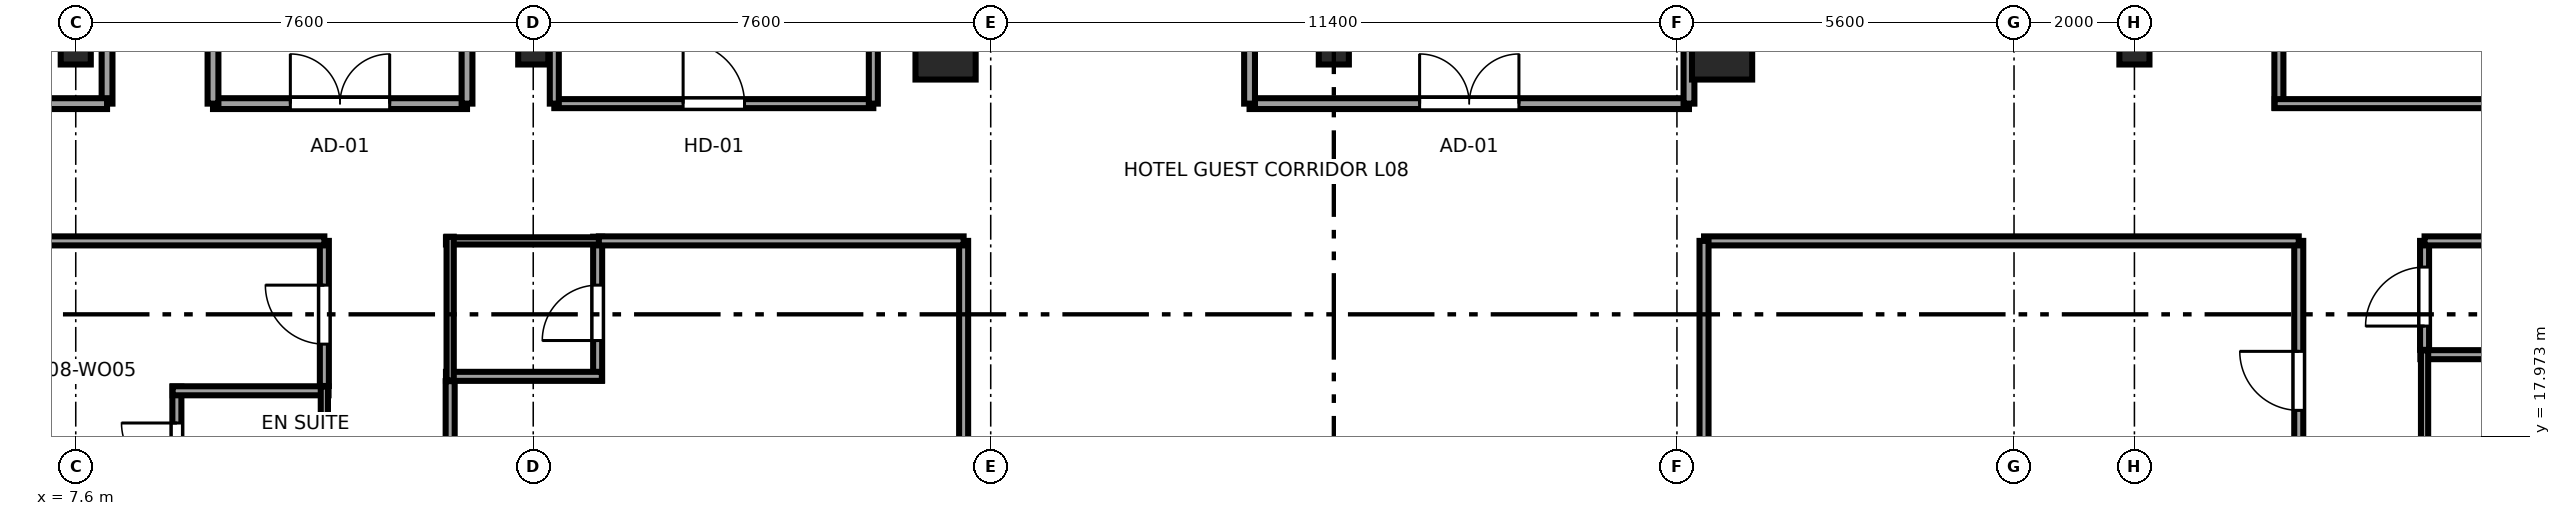
"""IFC4 building model, lengths in metres.
Left out: names, types, materials, properties, quantities, classifications, styles, units other than length and angle.
Written with IfcOpenShell. Run it as: python <this file> out.ifc"""

import sys

from ifc_helpers import new_model, si_unit, direction, frame, frame_2d, origin, origin_2d, place, context, subcontext, project, spatial, rectangle, i_section, extrude, source, transform, mapped, element, fill, save


model = new_model("IFC4")
c1 = context("Model", 3, precision=1e-05, world=origin(), true_north=direction((0.0, 1.0)))
c2 = subcontext(c1, "Body", "Model", "MODEL_VIEW")
j1 = project(units=[si_unit("LENGTHUNIT", "METRE"), si_unit("PLANEANGLEUNIT", "RADIAN")], contexts=[c1])
p1 = place(None, origin())
s1 = spatial("IfcSite", under=j1, at=p1, CompositionType="ELEMENT")
p2 = place(p1, origin())
s2 = spatial("IfcBuilding", under=s1, at=p2, CompositionType="ELEMENT")
p3 = place(p2, frame((0.0, 0.0, 39.1)))
s3 = spatial("IfcBuildingStorey", under=s2, at=p3, CompositionType="ELEMENT", Elevation=39.1)
m1 = source(origin(), c2, "Body", "SweptSolid", [
    extrude(i_section(OverallWidth=0.5, OverallDepth=0.5, WebThickness=0.028, FlangeThickness=0.045, at=origin_2d()), origin(), (0.0, 0.0, 1.0), 3.55),
])
for number, where, z_axis, x_axis in (
    (1, (7.6, 24.4, 0.0), (0.0, 0.0, 1.0), (1.0, 0.0, 0.0)),
    (2, (15.2, 24.4, 0.0), (0.0, 0.0, 1.0), (1.0, 0.0, 0.0)),
):
    element("IfcColumn", number, at=place(p3, frame(where, z_axis=z_axis, x_axis=x_axis)), inside=s3, PredefinedType="COLUMN", context=c2, shape_type="MappedRepresentation", body=[
        mapped(m1, transform((0.0, 0.0, 0.0), x_axis=(1.0, 0.0, 0.0), y_axis=(0.0, 1.0, 0.0), z_axis=(0.0, 0.0, 1.0), scale=1.0)),
    ])
m2 = source(origin(), c2, "Body", "SweptSolid", [
    extrude(rectangle(XDim=1.0, YDim=1.0, at=origin_2d()), origin(), (0.0, 0.0, 1.0), 3.55),
])
for number, where, z_axis, x_axis in (
    (3, (22.05, 24.4, 0.0), (0.0, 0.0, 1.0), (1.0, 0.0, 0.0)),
    (4, (34.95, 24.4, 0.0), (0.0, 0.0, 1.0), (1.0, 0.0, 0.0)),
):
    element("IfcColumn", number, at=place(p3, frame(where, z_axis=z_axis, x_axis=x_axis)), inside=s3, PredefinedType="COLUMN", context=c2, shape_type="MappedRepresentation", body=[
        mapped(m2, transform((0.0, 0.0, 0.0), x_axis=(1.0, 0.0, 0.0), y_axis=(0.0, 1.0, 0.0), z_axis=(0.0, 0.0, 1.0), scale=1.0)),
    ])
for number, where, z_axis, x_axis in (
    (5, (41.8, 24.4, 0.0), (0.0, 0.0, 1.0), (1.0, 0.0, 0.0)),
    (6, (28.5, 24.4, 0.0), (0.0, 0.0, 1.0), (1.0, 0.0, 0.0)),
):
    element("IfcColumn", number, at=place(p3, frame(where, z_axis=z_axis, x_axis=x_axis)), inside=s3, PredefinedType="COLUMN", context=c2, shape_type="MappedRepresentation", body=[
        mapped(m1, transform((0.0, 0.0, 0.0), x_axis=(1.0, 0.0, 0.0), y_axis=(0.0, 1.0, 0.0), z_axis=(0.0, 0.0, 1.0), scale=1.0)),
    ])
p4 = place(p3, frame((9.28, 16.81, 0.0), z_axis=(0.0, 0.0, 1.0), x_axis=(0.0, 1.0, 0.0)))
e7 = element("IfcWall", 7, at=p4, inside=s3, PredefinedType="PARTITIONING", context=c2, shape_type="SweptSolid", body=[
    extrude(rectangle(XDim=1.99, YDim=0.15, at=frame_2d((0.995, 0.0))), origin(), (0.0, 0.0, 1.0), 3.37),
])
p5 = place(p4, frame((0.465, 0.0, 0.0)))
e8 = element("IfcOpeningElement", 8, at=p5, cuts=e7, PredefinedType="OPENING", context=c2, shape_type="SweptSolid", body=[
    extrude(rectangle(XDim=0.92, YDim=2.01, at=frame_2d((0.46, 1.005))), frame((0.0, 0.085, 0.0), z_axis=(0.0, -1.0, 0.0), x_axis=(1.0, 0.0, 0.0)), (0.0, 0.0, 1.0), 0.17),
])
p6 = place(p3, frame((9.21, 18.73, 0.0), z_axis=(0.0, 0.0, 1.0), x_axis=(1.0, 0.0, 0.0)))
e9 = element("IfcWall", 9, at=p6, inside=s3, PredefinedType="PARTITIONING", context=c2, shape_type="SweptSolid", body=[
    extrude(rectangle(XDim=2.59, YDim=0.15, at=frame_2d((1.295, 0.0))), origin(), (0.0, 0.0, 1.0), 3.37),
])
p7 = place(p3, frame((11.73, 16.81, 0.0), z_axis=(0.0, 0.0, 1.0), x_axis=(0.0, 1.0, 0.0)))
e10 = element("IfcWall", 10, at=p7, inside=s3, PredefinedType="PLUMBINGWALL", context=c2, shape_type="SweptSolid", body=[
    extrude(rectangle(XDim=1.99, YDim=0.12, at=frame_2d((0.995, 0.0))), origin(), (0.0, 0.0, 1.0), 3.37),
])
p8 = place(p3, frame((16.27, 18.9, 0.0), z_axis=(0.0, 0.0, 1.0), x_axis=(0.0, 1.0, 0.0)))
e11 = element("IfcWall", 11, at=p8, inside=s3, PredefinedType="PARTITIONING", context=c2, shape_type="SweptSolid", body=[
    extrude(rectangle(XDim=2.39, YDim=0.15, at=frame_2d((1.195, 0.0))), origin(), (0.0, 0.0, 1.0), 3.37),
])
p9 = place(p8, frame((0.665, 0.0, 0.0)))
e12 = element("IfcOpeningElement", 12, at=p9, cuts=e11, PredefinedType="OPENING", context=c2, shape_type="SweptSolid", body=[
    extrude(rectangle(XDim=0.92, YDim=2.01, at=frame_2d((0.46, 1.005))), frame((0.0, 0.085, 0.0), z_axis=(0.0, -1.0, 0.0), x_axis=(1.0, 0.0, 0.0)), (0.0, 0.0, 1.0), 0.17),
])
p10 = place(p3, frame((13.75, 18.97, 0.0), z_axis=(0.0, 0.0, 1.0), x_axis=(1.0, 0.0, 0.0)))
e13 = element("IfcWall", 13, at=p10, inside=s3, PredefinedType="PARTITIONING", context=c2, shape_type="SweptSolid", body=[
    extrude(rectangle(XDim=2.59, YDim=0.15, at=frame_2d((1.295, 0.0))), origin(), (0.0, 0.0, 1.0), 3.37),
])
p11 = place(p3, frame((13.75, 21.22, 0.0), z_axis=(0.0, 0.0, 1.0), x_axis=(1.0, 0.0, 0.0)))
e14 = element("IfcWall", 14, at=p11, inside=s3, PredefinedType="PLUMBINGWALL", context=c2, shape_type="SweptSolid", body=[
    extrude(rectangle(XDim=2.59, YDim=0.12, at=frame_2d((1.295, 0.0))), origin(), (0.0, 0.0, 1.0), 3.37),
])
p12 = place(p3, frame((13.82, 18.9, 0.0), z_axis=(0.0, 0.0, 1.0), x_axis=(0.0, 1.0, 0.0)))
e15 = element("IfcWall", 15, at=p12, inside=s3, PredefinedType="PLUMBINGWALL", context=c2, shape_type="SweptSolid", body=[
    extrude(rectangle(XDim=2.39, YDim=0.12, at=frame_2d((1.195, 0.0))), origin(), (0.0, 0.0, 1.0), 3.37),
])
p13 = place(p3, frame((46.55, 19.33, 0.0), z_axis=(0.0, 0.0, 1.0), x_axis=(1.0, 0.0, 0.0)))
e16 = element("IfcWall", 16, at=p13, inside=s3, PredefinedType="PARTITIONING", context=c2, shape_type="SweptSolid", body=[
    extrude(rectangle(XDim=2.59, YDim=0.15, at=frame_2d((1.295, 0.0))), origin(), (0.0, 0.0, 1.0), 3.37),
])
p14 = place(p3, frame((46.62, 17.41, 0.0), z_axis=(0.0, 0.0, 1.0), x_axis=(0.0, 1.0, 0.0)))
e17 = element("IfcWall", 17, at=p14, inside=s3, PredefinedType="PLUMBINGWALL", context=c2, shape_type="SweptSolid", body=[
    extrude(rectangle(XDim=1.99, YDim=0.12, at=frame_2d((0.995, 0.0))), origin(), (0.0, 0.0, 1.0), 3.37),
])
p15 = place(p3, frame((11.73, 18.81, 0.0), z_axis=(0.0, 0.0, 1.0), x_axis=(0.0, 1.0, 0.0)))
e18 = element("IfcWall", 18, at=p15, inside=s3, PredefinedType="PARTITIONING", context=c2, shape_type="SweptSolid", body=[
    extrude(rectangle(XDim=2.41, YDim=0.15, at=frame_2d((1.205, 0.0))), origin(), (0.0, 0.0, 1.0), 3.37),
])
p16 = place(p15, frame((0.695, 0.0, 0.0)))
e19 = element("IfcOpeningElement", 19, at=p16, cuts=e18, PredefinedType="OPENING", context=c2, shape_type="SweptSolid", body=[
    extrude(rectangle(XDim=0.98, YDim=2.12, at=frame_2d((0.49, 1.06))), frame((0.0, 0.085, 0.0), z_axis=(0.0, -1.0, 0.0), x_axis=(1.0, 0.0, 0.0)), (0.0, 0.0, 1.0), 0.17),
])
p17 = place(p3, frame((0.405, 21.22, 0.0), z_axis=(0.0, 0.0, 1.0), x_axis=(1.0, 0.0, 0.0)))
e20 = element("IfcWall", 20, at=p17, inside=s3, PredefinedType="PARTITIONING", context=c2, shape_type="SweptSolid", body=[
    extrude(rectangle(XDim=11.325, YDim=0.15, at=frame_2d((5.663, 0.0))), origin(), (0.0, 0.0, 1.0), 3.37),
])
p18 = place(p3, frame((13.82, 14.48, 0.0), z_axis=(0.0, 0.0, 1.0), x_axis=(0.0, 1.0, 0.0)))
e21 = element("IfcWall", 21, at=p18, inside=s3, PredefinedType="PARTITIONING", context=c2, shape_type="SweptSolid", body=[
    extrude(rectangle(XDim=4.41, YDim=0.15, at=frame_2d((2.205, 0.0))), origin(), (0.0, 0.0, 1.0), 3.37),
])
p19 = place(p18, frame((1.995, 0.0, 0.0)))
e22 = element("IfcOpeningElement", 22, at=p19, cuts=e21, PredefinedType="OPENING", context=c2, shape_type="SweptSolid", body=[
    extrude(rectangle(XDim=0.98, YDim=2.12, at=frame_2d((0.49, 1.06))), frame((0.0, 0.085, 0.0), z_axis=(0.0, -1.0, 0.0), x_axis=(1.0, 0.0, 0.0)), (0.0, 0.0, 1.0), 0.17),
])
p20 = place(p3, frame((22.35, 14.48, 0.0), z_axis=(0.0, 0.0, 1.0), x_axis=(0.0, 1.0, 0.0)))
e23 = element("IfcWall", 23, at=p20, inside=s3, PredefinedType="PARTITIONING", context=c2, shape_type="SweptSolid", body=[
    extrude(rectangle(XDim=6.74, YDim=0.15, at=frame_2d((3.37, 0.0))), origin(), (0.0, 0.0, 1.0), 3.37),
])
p21 = place(p3, frame((16.29, 21.22, 0.0), z_axis=(0.0, 0.0, 1.0), x_axis=(1.0, 0.0, 0.0)))
e24 = element("IfcWall", 24, at=p21, inside=s3, PredefinedType="PARTITIONING", context=c2, shape_type="SweptSolid", body=[
    extrude(rectangle(XDim=6.06, YDim=0.15, at=frame_2d((3.03, 0.0))), origin(), (0.0, 0.0, 1.0), 3.37),
])
p22 = place(p3, frame((44.53, 16.61, 0.0), z_axis=(0.0, 0.0, 1.0), x_axis=(0.0, 1.0, 0.0)))
e25 = element("IfcWall", 25, at=p22, inside=s3, PredefinedType="PARTITIONING", context=c2, shape_type="SweptSolid", body=[
    extrude(rectangle(XDim=4.61, YDim=0.15, at=frame_2d((2.305, 0.0))), origin(), (0.0, 0.0, 1.0), 3.37),
])
p23 = place(p22, frame((1.795, 0.0, 0.0)))
e26 = element("IfcOpeningElement", 26, at=p23, cuts=e25, PredefinedType="OPENING", context=c2, shape_type="SweptSolid", body=[
    extrude(rectangle(XDim=0.98, YDim=2.12, at=frame_2d((0.49, 1.06))), frame((0.0, 0.085, 0.0), z_axis=(0.0, -1.0, 0.0), x_axis=(1.0, 0.0, 0.0)), (0.0, 0.0, 1.0), 0.17),
])
p24 = place(p3, frame((34.65, 21.22, 0.0), z_axis=(0.0, 0.0, 1.0), x_axis=(1.0, 0.0, 0.0)))
e27 = element("IfcWall", 27, at=p24, inside=s3, PredefinedType="PARTITIONING", context=c2, shape_type="SweptSolid", body=[
    extrude(rectangle(XDim=9.88, YDim=0.15, at=frame_2d((4.94, 0.0))), origin(), (0.0, 0.0, 1.0), 3.37),
])
p25 = place(p3, frame((34.65, 14.28, 0.0), z_axis=(0.0, 0.0, 1.0), x_axis=(0.0, 1.0, 0.0)))
e28 = element("IfcWall", 28, at=p25, inside=s3, PredefinedType="PARTITIONING", context=c2, shape_type="SweptSolid", body=[
    extrude(rectangle(XDim=6.94, YDim=0.15, at=frame_2d((3.47, 0.0))), origin(), (0.0, 0.0, 1.0), 3.37),
])
p26 = place(p3, frame((46.62, 19.41, 0.0), z_axis=(0.0, 0.0, 1.0), x_axis=(0.0, 1.0, 0.0)))
e29 = element("IfcWall", 29, at=p26, inside=s3, PredefinedType="PARTITIONING", context=c2, shape_type="SweptSolid", body=[
    extrude(rectangle(XDim=1.81, YDim=0.15, at=frame_2d((0.905, 0.0))), origin(), (0.0, 0.0, 1.0), 3.37),
])
p27 = place(p26, frame((0.395, 0.0, 0.0)))
e30 = element("IfcOpeningElement", 30, at=p27, cuts=e29, PredefinedType="OPENING", context=c2, shape_type="SweptSolid", body=[
    extrude(rectangle(XDim=0.98, YDim=2.12, at=frame_2d((0.49, 1.06))), frame((0.0, 0.085, 0.0), z_axis=(0.0, -1.0, 0.0), x_axis=(1.0, 0.0, 0.0)), (0.0, 0.0, 1.0), 0.17),
])
p28 = place(p3, frame((46.62, 21.22, 0.0), z_axis=(0.0, 0.0, 1.0), x_axis=(1.0, 0.0, 0.0)))
e31 = element("IfcWall", 31, at=p28, inside=s3, PredefinedType="PARTITIONING", context=c2, shape_type="SweptSolid", body=[
    extrude(rectangle(XDim=9.975, YDim=0.15, at=frame_2d((4.987, 0.0))), origin(), (0.0, 0.0, 1.0), 3.37),
])
p29 = place(p3, frame((8.12, 23.5, 0.0), z_axis=(0.0, 0.0, 1.0), x_axis=(0.0, 1.0, 0.0)))
e32 = element("IfcWall", 32, at=p29, inside=s3, PredefinedType="PARTITIONING", context=c2, shape_type="SweptSolid", body=[
    extrude(rectangle(XDim=5.2, YDim=0.18, at=frame_2d((2.6, 0.0))), origin(), (0.0, 0.0, 1.0), 3.37),
])
p30 = place(p29, frame((2.325, 0.0, 0.0)))
e33 = element("IfcOpeningElement", 33, at=p30, cuts=e32, PredefinedType="OPENING", context=c2, shape_type="SweptSolid", body=[
    extrude(rectangle(XDim=1.65, YDim=2.15, at=frame_2d((0.825, 1.075))), frame((0.0, 0.1, 0.0), z_axis=(0.0, -1.0, 0.0), x_axis=(1.0, 0.0, 0.0)), (0.0, 0.0, 1.0), 0.2),
])
p31 = place(p3, frame((0.405, 23.5, 0.0), z_axis=(0.0, 0.0, 1.0), x_axis=(1.0, 0.0, 0.0)))
e34 = element("IfcWall", 34, at=p31, inside=s3, PredefinedType="PARTITIONING", context=c2, shape_type="SweptSolid", body=[
    extrude(rectangle(XDim=7.715, YDim=0.18, at=frame_2d((3.857, 0.0))), origin(), (0.0, 0.0, 1.0), 3.37),
])
p32 = place(p3, frame((44.2, 23.43, 0.0), z_axis=(0.0, 0.0, 1.0), x_axis=(0.0, 1.0, 0.0)))
e35 = element("IfcWall", 35, at=p32, inside=s3, PredefinedType="PARTITIONING", context=c2, shape_type="SweptSolid", body=[
    extrude(rectangle(XDim=3.94, YDim=0.15, at=frame_2d((1.97, 0.0))), origin(), (0.0, 0.0, 1.0), 3.37),
])
p33 = place(p32, frame((1.34, 0.0, 0.0)))
e36 = element("IfcOpeningElement", 36, at=p33, cuts=e35, PredefinedType="OPENING", context=c2, shape_type="SweptSolid", body=[
    extrude(rectangle(XDim=0.92, YDim=2.01, at=frame_2d((0.46, 1.005))), frame((0.0, 0.085, 0.0), z_axis=(0.0, -1.0, 0.0), x_axis=(1.0, 0.0, 0.0)), (0.0, 0.0, 1.0), 0.17),
])
p34 = place(p3, frame((44.13, 23.5, 0.0), z_axis=(0.0, 0.0, 1.0), x_axis=(1.0, 0.0, 0.0)))
e37 = element("IfcWall", 37, at=p34, inside=s3, PredefinedType="PARTITIONING", context=c2, shape_type="SweptSolid", body=[
    extrude(rectangle(XDim=4.54, YDim=0.15, at=frame_2d((2.27, 0.0))), origin(), (0.0, 0.0, 1.0), 3.37),
])
p35 = place(p3, frame((9.88, 23.5, 0.0), z_axis=(0.0, 0.0, 1.0), x_axis=(1.0, 0.0, 0.0)))
e38 = element("IfcWall", 38, at=p35, inside=s3, PredefinedType="PARTITIONING", context=c2, shape_type="SweptSolid", body=[
    extrude(rectangle(XDim=4.22, YDim=0.18, at=frame_2d((2.11, 0.0))), origin(), (0.0, 0.0, 1.0), 3.37),
])
p36 = place(p35, frame((1.285, 0.0, 0.0)))
e39 = element("IfcOpeningElement", 39, at=p36, cuts=e38, PredefinedType="OPENING", context=c2, shape_type="SweptSolid", body=[
    extrude(rectangle(XDim=1.65, YDim=2.15, at=frame_2d((0.825, 1.075))), frame((0.0, 0.1, 0.0), z_axis=(0.0, -1.0, 0.0), x_axis=(1.0, 0.0, 0.0)), (0.0, 0.0, 1.0), 0.2),
])
for number, where, z_axis, x_axis in (
    (40, (9.88, 23.5, 0.0), (0.0, 0.0, 1.0), (0.0, 1.0, 0.0)),
    (41, (14.1, 23.5, 0.0), (0.0, 0.0, 1.0), (0.0, 1.0, 0.0)),
):
    element("IfcWall", number, at=place(p3, frame(where, z_axis=z_axis, x_axis=x_axis)), inside=s3, PredefinedType="PARTITIONING", context=c2, shape_type="SweptSolid", body=[
        extrude(rectangle(XDim=6.25, YDim=0.18, at=frame_2d((3.125, 0.0))), origin(), (0.0, 0.0, 1.0), 3.37),
    ])
p37 = place(p3, frame((27.1, 23.5, 0.0), z_axis=(0.0, 0.0, 1.0), x_axis=(1.0, 0.0, 0.0)))
e42 = element("IfcWall", 42, at=p37, inside=s3, PredefinedType="PARTITIONING", context=c2, shape_type="SweptSolid", body=[
    extrude(rectangle(XDim=7.3, YDim=0.18, at=frame_2d((3.65, 0.0))), origin(), (0.0, 0.0, 1.0), 3.37),
])
p38 = place(p37, frame((2.825, 0.0, 0.0)))
e43 = element("IfcOpeningElement", 43, at=p38, cuts=e42, PredefinedType="OPENING", context=c2, shape_type="SweptSolid", body=[
    extrude(rectangle(XDim=1.65, YDim=2.15, at=frame_2d((0.825, 1.075))), frame((0.0, 0.1, 0.0), z_axis=(0.0, -1.0, 0.0), x_axis=(1.0, 0.0, 0.0)), (0.0, 0.0, 1.0), 0.2),
])
for number, where, z_axis, x_axis in (
    (44, (27.1, 23.5, 0.0), (0.0, 0.0, 1.0), (0.0, 1.0, 0.0)),
    (45, (34.4, 23.5, 0.0), (0.0, 0.0, 1.0), (0.0, 1.0, 0.0)),
):
    element("IfcWall", number, at=place(p3, frame(where, z_axis=z_axis, x_axis=x_axis)), inside=s3, PredefinedType="PARTITIONING", context=c2, shape_type="SweptSolid", body=[
        extrude(rectangle(XDim=6.3, YDim=0.18, at=frame_2d((3.15, 0.0))), origin(), (0.0, 0.0, 1.0), 3.37),
    ])
p39 = place(p3, frame((15.55, 23.5, 0.0), z_axis=(0.0, 0.0, 1.0), x_axis=(1.0, 0.0, 0.0)))
e46 = element("IfcWall", 46, at=p39, inside=s3, PredefinedType="PARTITIONING", context=c2, shape_type="SweptSolid", body=[
    extrude(rectangle(XDim=5.3, YDim=0.15, at=frame_2d((2.65, 0.0))), origin(), (0.0, 0.0, 1.0), 3.37),
])
p40 = place(p39, frame((2.14, 0.0, 0.0)))
e47 = element("IfcOpeningElement", 47, at=p40, cuts=e46, PredefinedType="OPENING", context=c2, shape_type="SweptSolid", body=[
    extrude(rectangle(XDim=1.02, YDim=2.03, at=frame_2d((0.51, 1.015))), frame((0.0, 0.085, 0.0), z_axis=(0.0, -1.0, 0.0), x_axis=(1.0, 0.0, 0.0)), (0.0, 0.0, 1.0), 0.17),
])
for number, where, z_axis, x_axis in (
    (48, (15.55, 23.5, 0.0), (0.0, 0.0, 1.0), (0.0, 1.0, 0.0)),
    (49, (20.85, 23.5, 0.0), (0.0, 0.0, 1.0), (0.0, 1.0, 0.0)),
):
    element("IfcWall", number, at=place(p3, frame(where, z_axis=z_axis, x_axis=x_axis)), inside=s3, PredefinedType="PARTITIONING", context=c2, shape_type="SweptSolid", body=[
        extrude(rectangle(XDim=6.3, YDim=0.15, at=frame_2d((3.15, 0.0))), origin(), (0.0, 0.0, 1.0), 3.37),
    ])
m3 = source(origin(), c2, "Body", "SweptSolid", [
    extrude(rectangle(XDim=0.92, YDim=2.01, at=frame_2d((0.46, 1.005))), frame((0.0, 0.025, 0.0), z_axis=(0.0, -1.0, 0.0), x_axis=(1.0, 0.0, 0.0)), (0.0, 0.0, 1.0), 0.05),
])
p41 = place(p5, origin())
e50 = element("IfcDoor", 50, at=p41, inside=s3, OperationType="SINGLE_SWING_RIGHT", PredefinedType="DOOR", context=c2, shape_type="MappedRepresentation", body=[
    mapped(m3, transform((0.0, 0.0, 0.0), x_axis=(1.0, 0.0, 0.0), y_axis=(0.0, 1.0, 0.0), z_axis=(0.0, 0.0, 1.0), scale=1.0)),
])
fill(e8, e50)
p42 = place(p9, origin())
e51 = element("IfcDoor", 51, at=p42, inside=s3, OperationType="SINGLE_SWING_LEFT", PredefinedType="DOOR", context=c2, shape_type="MappedRepresentation", body=[
    mapped(m3, transform((0.0, 0.0, 0.0), x_axis=(1.0, 0.0, 0.0), y_axis=(0.0, 1.0, 0.0), z_axis=(0.0, 0.0, 1.0), scale=1.0)),
])
fill(e12, e51)
m4 = source(origin(), c2, "Body", "SweptSolid", [
    extrude(rectangle(XDim=0.98, YDim=2.12, at=frame_2d((0.49, 1.06))), frame((0.0, 0.025, 0.0), z_axis=(0.0, -1.0, 0.0), x_axis=(1.0, 0.0, 0.0)), (0.0, 0.0, 1.0), 0.05),
])
p43 = place(p16, origin())
e52 = element("IfcDoor", 52, at=p43, inside=s3, OperationType="SINGLE_SWING_RIGHT", PredefinedType="DOOR", context=c2, shape_type="MappedRepresentation", body=[
    mapped(m4, transform((0.0, 0.0, 0.0), x_axis=(1.0, 0.0, 0.0), y_axis=(0.0, 1.0, 0.0), z_axis=(0.0, 0.0, 1.0), scale=1.0)),
])
fill(e19, e52)
p44 = place(p23, origin())
e53 = element("IfcDoor", 53, at=p44, inside=s3, OperationType="SINGLE_SWING_RIGHT", PredefinedType="DOOR", context=c2, shape_type="MappedRepresentation", body=[
    mapped(m4, transform((0.0, 0.0, 0.0), x_axis=(1.0, 0.0, 0.0), y_axis=(0.0, 1.0, 0.0), z_axis=(0.0, 0.0, 1.0), scale=1.0)),
])
fill(e26, e53)
p45 = place(p27, origin())
e54 = element("IfcDoor", 54, at=p45, inside=s3, OperationType="SINGLE_SWING_LEFT", PredefinedType="DOOR", context=c2, shape_type="MappedRepresentation", body=[
    mapped(m4, transform((0.0, 0.0, 0.0), x_axis=(1.0, 0.0, 0.0), y_axis=(0.0, 1.0, 0.0), z_axis=(0.0, 0.0, 1.0), scale=1.0)),
])
fill(e30, e54)
m5 = source(origin(), c2, "Body", "SweptSolid", [
    extrude(rectangle(XDim=1.65, YDim=2.15, at=frame_2d((0.825, 1.075))), frame((0.0, 0.025, 0.0), z_axis=(0.0, -1.0, 0.0), x_axis=(1.0, 0.0, 0.0)), (0.0, 0.0, 1.0), 0.05),
])
p46 = place(p36, origin())
e55 = element("IfcDoor", 55, at=p46, inside=s3, OperationType="DOUBLE_DOOR_SINGLE_SWING", PredefinedType="DOOR", context=c2, shape_type="MappedRepresentation", body=[
    mapped(m5, transform((0.0, 0.0, 0.0), x_axis=(1.0, 0.0, 0.0), y_axis=(0.0, 1.0, 0.0), z_axis=(0.0, 0.0, 1.0), scale=1.0)),
])
fill(e39, e55)
p47 = place(p38, origin())
e56 = element("IfcDoor", 56, at=p47, inside=s3, OperationType="DOUBLE_DOOR_SINGLE_SWING", PredefinedType="DOOR", context=c2, shape_type="MappedRepresentation", body=[
    mapped(m5, transform((0.0, 0.0, 0.0), x_axis=(1.0, 0.0, 0.0), y_axis=(0.0, 1.0, 0.0), z_axis=(0.0, 0.0, 1.0), scale=1.0)),
])
fill(e43, e56)
m6 = source(origin(), c2, "Body", "SweptSolid", [
    extrude(rectangle(XDim=1.02, YDim=2.03, at=frame_2d((0.51, 1.015))), frame((0.0, 0.025, 0.0), z_axis=(0.0, -1.0, 0.0), x_axis=(1.0, 0.0, 0.0)), (0.0, 0.0, 1.0), 0.05),
])
p48 = place(p40, origin())
e57 = element("IfcDoor", 57, at=p48, inside=s3, OperationType="SINGLE_SWING_LEFT", PredefinedType="DOOR", context=c2, shape_type="MappedRepresentation", body=[
    mapped(m6, transform((0.0, 0.0, 0.0), x_axis=(1.0, 0.0, 0.0), y_axis=(0.0, 1.0, 0.0), z_axis=(0.0, 0.0, 1.0), scale=1.0)),
])
fill(e47, e57)
save(model, sys.argv[1])
